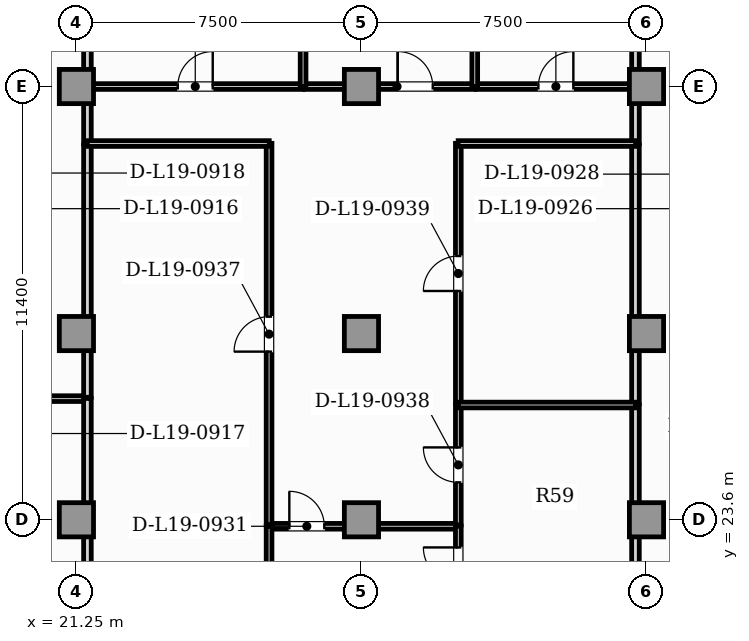
"""IFC4 building model, lengths in metres.
Left out: names, types, materials, properties, quantities, classifications, styles, units other than length and angle.
Written with IfcOpenShell. Run it as: python <this file> out.ifc"""

import sys

from ifc_helpers import new_model, si_unit, direction, frame, frame_2d, origin, origin_2d, place, context, subcontext, project, spatial, rectangle, extrude, element, fill, save


model = new_model("IFC4")
c1 = context("Model", 3, precision=1e-05, world=origin(), true_north=direction((0.0, 1.0)))
c2 = subcontext(c1, "Body", "Model", "MODEL_VIEW")
j1 = project(units=[si_unit("LENGTHUNIT", "METRE"), si_unit("PLANEANGLEUNIT", "RADIAN")], contexts=[c1])
p1 = place(None, origin())
s1 = spatial("IfcSite", under=j1, at=p1, CompositionType="ELEMENT")
p2 = place(p1, origin())
s2 = spatial("IfcBuilding", under=s1, at=p2, CompositionType="ELEMENT")
p3 = place(p2, frame((0.0, 0.0, 81.05)))
s3 = spatial("IfcBuildingStorey", under=s2, at=p3, CompositionType="ELEMENT", Elevation=81.05)
for number, where, z_axis, x_axis in (
    (1, (21.25, 23.6, 0.0), (0.0, 0.0, 1.0), (1.0, 0.0, 0.0)),
    (2, (28.75, 23.6, 0.0), (0.0, 0.0, 1.0), (1.0, 0.0, 0.0)),
    (3, (36.25, 23.6, 0.0), (0.0, 0.0, 1.0), (1.0, 0.0, 0.0)),
    (4, (21.25, 28.5, 0.0), (0.0, 0.0, 1.0), (1.0, 0.0, 0.0)),
    (5, (28.75, 28.5, 0.0), (0.0, 0.0, 1.0), (1.0, 0.0, 0.0)),
    (6, (36.25, 28.5, 0.0), (0.0, 0.0, 1.0), (1.0, 0.0, 0.0)),
    (7, (21.25, 35.0, 0.0), (0.0, 0.0, 1.0), (1.0, 0.0, 0.0)),
    (8, (28.75, 35.0, 0.0), (0.0, 0.0, 1.0), (1.0, 0.0, 0.0)),
    (9, (36.25, 35.0, 0.0), (0.0, 0.0, 1.0), (1.0, 0.0, 0.0)),
):
    element("IfcColumn", number, at=place(p3, frame(where, z_axis=z_axis, x_axis=x_axis)), inside=s3, PredefinedType="COLUMN", context=c2, shape_type="SweptSolid", body=[
        extrude(rectangle(XDim=0.9, YDim=0.9, at=origin_2d()), origin(), (0.0, 0.0, 1.0), 3.85),
    ])
p4 = place(p3, frame((18.818, 26.788, 0.0), z_axis=(0.0, 0.0, 1.0), x_axis=(1.0, 0.0, 0.0)))
e10 = element("IfcWall", 10, at=p4, inside=s3, PredefinedType="PARTITIONING", context=c2, shape_type="SweptSolid", body=[
    extrude(rectangle(XDim=2.727, YDim=0.15, at=frame_2d((1.364, 0.0))), origin(), (0.0, 0.0, 1.0), 3.6),
])
p5 = place(p3, frame((21.54, 17.769, 0.0), z_axis=(0.0, 0.0, 1.0), x_axis=(0.0, 1.0, 0.0)))
e11 = element("IfcWall", 11, at=p5, inside=s3, PredefinedType="PARTITIONING", context=c2, shape_type="SweptSolid", body=[
    extrude(rectangle(XDim=9.024, YDim=0.2, at=frame_2d((4.512, 0.0))), origin(), (0.0, 0.0, 1.0), 3.6),
])
p6 = place(p3, frame((21.54, 33.495, 0.0), z_axis=(0.0, 0.0, 1.0), x_axis=(0.0, 1.0, 0.0)))
e12 = element("IfcWall", 12, at=p6, inside=s3, PredefinedType="PARTITIONING", context=c2, shape_type="SweptSolid", body=[
    extrude(rectangle(XDim=1.51, YDim=0.2, at=frame_2d((0.755, 0.0))), origin(), (0.0, 0.0, 1.0), 3.6),
])
p7 = place(p3, frame((21.54, 26.823, 0.0), z_axis=(0.0, 0.0, 1.0), x_axis=(0.0, 1.0, 0.0)))
e13 = element("IfcWall", 13, at=p7, inside=s3, PredefinedType="PARTITIONING", context=c2, shape_type="SweptSolid", body=[
    extrude(rectangle(XDim=6.642, YDim=0.2, at=frame_2d((3.321, 0.0))), origin(), (0.0, 0.0, 1.0), 3.6),
])
p8 = place(p3, frame((21.54, 35.035, 0.0), z_axis=(0.0, 0.0, 1.0), x_axis=(0.0, 1.0, 0.0)))
e14 = element("IfcWall", 14, at=p8, inside=s3, PredefinedType="PARTITIONING", context=c2, shape_type="SweptSolid", body=[
    extrude(rectangle(XDim=3.55, YDim=0.2, at=frame_2d((1.775, 0.0))), origin(), (0.0, 0.0, 1.0), 3.6),
])
p9 = place(p3, frame((35.96, 33.495, 0.0), z_axis=(0.0, 0.0, 1.0), x_axis=(0.0, 1.0, 0.0)))
e15 = element("IfcWall", 15, at=p9, inside=s3, PredefinedType="PARTITIONING", context=c2, shape_type="SweptSolid", body=[
    extrude(rectangle(XDim=1.51, YDim=0.2, at=frame_2d((0.755, 0.0))), origin(), (0.0, 0.0, 1.0), 3.6),
])
p10 = place(p3, frame((35.96, 21.391, 0.0), z_axis=(0.0, 0.0, 1.0), x_axis=(0.0, 1.0, 0.0)))
e16 = element("IfcWall", 16, at=p10, inside=s3, PredefinedType="PARTITIONING", context=c2, shape_type="SweptSolid", body=[
    extrude(rectangle(XDim=5.234, YDim=0.2, at=frame_2d((2.617, 0.0))), origin(), (0.0, 0.0, 1.0), 3.6),
])
p11 = place(p3, frame((35.96, 26.655, 0.0), z_axis=(0.0, 0.0, 1.0), x_axis=(0.0, 1.0, 0.0)))
e17 = element("IfcWall", 17, at=p11, inside=s3, PredefinedType="PARTITIONING", context=c2, shape_type="SweptSolid", body=[
    extrude(rectangle(XDim=6.81, YDim=0.2, at=frame_2d((3.405, 0.0))), origin(), (0.0, 0.0, 1.0), 3.6),
])
p12 = place(p3, frame((35.96, 35.035, 0.0), z_axis=(0.0, 0.0, 1.0), x_axis=(0.0, 1.0, 0.0)))
e18 = element("IfcWall", 18, at=p12, inside=s3, PredefinedType="PARTITIONING", context=c2, shape_type="SweptSolid", body=[
    extrude(rectangle(XDim=3.55, YDim=0.2, at=frame_2d((1.775, 0.0))), origin(), (0.0, 0.0, 1.0), 3.6),
])
p13 = place(p3, frame((26.314, 23.429, 0.0), z_axis=(0.0, 0.0, 1.0), x_axis=(1.0, 0.0, 0.0)))
e19 = element("IfcWall", 19, at=p13, inside=s3, PredefinedType="PARTITIONING", context=c2, shape_type="SweptSolid", body=[
    extrude(rectangle(XDim=4.99, YDim=0.15, at=frame_2d((2.495, 0.0))), origin(), (0.0, 0.0, 1.0), 2.964),
])
p14 = place(p13, frame((0.538, 0.0, 0.0)))
e20 = element("IfcOpeningElement", 20, at=p14, cuts=e19, PredefinedType="OPENING", context=c2, shape_type="SweptSolid", body=[
    extrude(rectangle(XDim=0.92, YDim=2.1, at=frame_2d((0.46, 1.05))), frame((0.0, 0.085, 0.0), z_axis=(0.0, -1.0, 0.0), x_axis=(1.0, 0.0, 0.0)), (0.0, 0.0, 1.0), 0.17),
])
p15 = place(p3, frame((26.319, 15.635, 0.0), z_axis=(0.0, 0.0, 1.0), x_axis=(0.0, 1.0, 0.0)))
e21 = element("IfcWall", 21, at=p15, inside=s3, PredefinedType="PARTITIONING", context=c2, shape_type="SweptSolid", body=[
    extrude(rectangle(XDim=7.799, YDim=0.15, at=frame_2d((3.9, 0.0))), origin(), (0.0, 0.0, 1.0), 3.6),
])
p16 = place(p15, frame((3.44, 0.0, 0.0)))
e22 = element("IfcOpeningElement", 22, at=p16, cuts=e21, PredefinedType="OPENING", context=c2, shape_type="SweptSolid", body=[
    extrude(rectangle(XDim=0.92, YDim=2.1, at=frame_2d((0.46, 1.05))), frame((0.0, 0.085, 0.0), z_axis=(0.0, -1.0, 0.0), x_axis=(1.0, 0.0, 0.0)), (0.0, 0.0, 1.0), 0.17),
])
p17 = place(p3, frame((31.299, 21.391, 0.0), z_axis=(0.0, 0.0, 1.0), x_axis=(0.0, 1.0, 0.0)))
e23 = element("IfcWall", 23, at=p17, inside=s3, PredefinedType="PARTITIONING", context=c2, shape_type="SweptSolid", body=[
    extrude(rectangle(XDim=2.043, YDim=0.15, at=frame_2d((1.021, 0.0))), origin(), (0.0, 0.0, 1.0), 3.6),
])
p18 = place(p17, frame((0.562, 0.0, 0.0)))
e24 = element("IfcOpeningElement", 24, at=p18, cuts=e23, PredefinedType="OPENING", context=c2, shape_type="SweptSolid", body=[
    extrude(rectangle(XDim=0.92, YDim=2.1, at=frame_2d((0.46, 1.05))), frame((0.0, 0.085, 0.0), z_axis=(0.0, -1.0, 0.0), x_axis=(1.0, 0.0, 0.0)), (0.0, 0.0, 1.0), 0.17),
])
p19 = place(p3, frame((26.319, 23.464, 0.0), z_axis=(0.0, 0.0, 1.0), x_axis=(0.0, 1.0, 0.0)))
e25 = element("IfcWall", 25, at=p19, inside=s3, PredefinedType="PARTITIONING", context=c2, shape_type="SweptSolid", body=[
    extrude(rectangle(XDim=10.041, YDim=0.15, at=frame_2d((5.02, 0.0))), origin(), (0.0, 0.0, 1.0), 3.6),
])
p20 = place(p19, frame((4.56, 0.0, 0.0)))
e26 = element("IfcOpeningElement", 26, at=p20, cuts=e25, PredefinedType="OPENING", context=c2, shape_type="SweptSolid", body=[
    extrude(rectangle(XDim=0.92, YDim=2.1, at=frame_2d((0.46, 1.05))), frame((0.0, 0.085, 0.0), z_axis=(0.0, -1.0, 0.0), x_axis=(1.0, 0.0, 0.0)), (0.0, 0.0, 1.0), 0.17),
])
p21 = place(p3, frame((21.535, 33.5, 0.0), z_axis=(0.0, 0.0, 1.0), x_axis=(1.0, 0.0, 0.0)))
e27 = element("IfcWall", 27, at=p21, inside=s3, PredefinedType="PARTITIONING", context=c2, shape_type="SweptSolid", body=[
    extrude(rectangle(XDim=4.789, YDim=0.15, at=frame_2d((2.395, 0.0))), origin(), (0.0, 0.0, 1.0), 3.6),
])
p22 = place(p3, frame((31.299, 23.464, 0.0), z_axis=(0.0, 0.0, 1.0), x_axis=(0.0, 1.0, 0.0)))
e28 = element("IfcWall", 28, at=p22, inside=s3, PredefinedType="PARTITIONING", context=c2, shape_type="SweptSolid", body=[
    extrude(rectangle(XDim=3.161, YDim=0.15, at=frame_2d((1.58, 0.0))), origin(), (0.0, 0.0, 1.0), 3.6),
])
p23 = place(p22, frame((1.12, 0.0, 0.0)))
e29 = element("IfcOpeningElement", 29, at=p23, cuts=e28, PredefinedType="OPENING", context=c2, shape_type="SweptSolid", body=[
    extrude(rectangle(XDim=0.92, YDim=2.1, at=frame_2d((0.46, 1.05))), frame((0.0, 0.085, 0.0), z_axis=(0.0, -1.0, 0.0), x_axis=(1.0, 0.0, 0.0)), (0.0, 0.0, 1.0), 0.17),
])
p24 = place(p3, frame((31.299, 26.655, 0.0), z_axis=(0.0, 0.0, 1.0), x_axis=(0.0, 1.0, 0.0)))
e30 = element("IfcWall", 30, at=p24, inside=s3, PredefinedType="PARTITIONING", context=c2, shape_type="SweptSolid", body=[
    extrude(rectangle(XDim=6.85, YDim=0.15, at=frame_2d((3.425, 0.0))), origin(), (0.0, 0.0, 1.0), 3.6),
])
p25 = place(p24, frame((2.965, 0.0, 0.0)))
e31 = element("IfcOpeningElement", 31, at=p25, cuts=e30, PredefinedType="OPENING", context=c2, shape_type="SweptSolid", body=[
    extrude(rectangle(XDim=0.92, YDim=2.1, at=frame_2d((0.46, 1.05))), frame((0.0, 0.085, 0.0), z_axis=(0.0, -1.0, 0.0), x_axis=(1.0, 0.0, 0.0)), (0.0, 0.0, 1.0), 0.17),
])
p26 = place(p3, frame((31.294, 33.5, 0.0), z_axis=(0.0, 0.0, 1.0), x_axis=(1.0, 0.0, 0.0)))
e32 = element("IfcWall", 32, at=p26, inside=s3, PredefinedType="PARTITIONING", context=c2, shape_type="SweptSolid", body=[
    extrude(rectangle(XDim=4.671, YDim=0.15, at=frame_2d((2.335, 0.0))), origin(), (0.0, 0.0, 1.0), 3.6),
])
p27 = place(p3, frame((21.535, 35.0, 0.0), z_axis=(0.0, 0.0, 1.0), x_axis=(1.0, 0.0, 0.0)))
e33 = element("IfcWall", 33, at=p27, inside=s3, PredefinedType="PARTITIONING", context=c2, shape_type="SweptSolid", body=[
    extrude(rectangle(XDim=5.684, YDim=0.15, at=frame_2d((2.842, 0.0))), origin(), (0.0, 0.0, 1.0), 2.964),
])
p28 = place(p27, frame((2.382, 0.0, 0.0)))
e34 = element("IfcOpeningElement", 34, at=p28, cuts=e33, PredefinedType="OPENING", context=c2, shape_type="SweptSolid", body=[
    extrude(rectangle(XDim=0.92, YDim=2.1, at=frame_2d((0.46, 1.05))), frame((0.0, 0.085, 0.0), z_axis=(0.0, -1.0, 0.0), x_axis=(1.0, 0.0, 0.0)), (0.0, 0.0, 1.0), 0.17),
])
p29 = place(p3, frame((27.249, 35.0, 0.0), z_axis=(0.0, 0.0, 1.0), x_axis=(1.0, 0.0, 0.0)))
e35 = element("IfcWall", 35, at=p29, inside=s3, PredefinedType="PARTITIONING", context=c2, shape_type="SweptSolid", body=[
    extrude(rectangle(XDim=4.488, YDim=0.15, at=frame_2d((2.244, 0.0))), origin(), (0.0, 0.0, 1.0), 2.964),
])
p30 = place(p29, frame((2.457, 0.0, 0.0)))
e36 = element("IfcOpeningElement", 36, at=p30, cuts=e35, PredefinedType="OPENING", context=c2, shape_type="SweptSolid", body=[
    extrude(rectangle(XDim=0.92, YDim=2.1, at=frame_2d((0.46, 1.05))), frame((0.0, 0.085, 0.0), z_axis=(0.0, -1.0, 0.0), x_axis=(1.0, 0.0, 0.0)), (0.0, 0.0, 1.0), 0.17),
])
p31 = place(p3, frame((31.767, 35.0, 0.0), z_axis=(0.0, 0.0, 1.0), x_axis=(1.0, 0.0, 0.0)))
e37 = element("IfcWall", 37, at=p31, inside=s3, PredefinedType="PARTITIONING", context=c2, shape_type="SweptSolid", body=[
    extrude(rectangle(XDim=4.198, YDim=0.15, at=frame_2d((2.099, 0.0))), origin(), (0.0, 0.0, 1.0), 2.964),
])
p32 = place(p31, frame((1.639, 0.0, 0.0)))
e38 = element("IfcOpeningElement", 38, at=p32, cuts=e37, PredefinedType="OPENING", context=c2, shape_type="SweptSolid", body=[
    extrude(rectangle(XDim=0.92, YDim=2.1, at=frame_2d((0.46, 1.05))), frame((0.0, 0.085, 0.0), z_axis=(0.0, -1.0, 0.0), x_axis=(1.0, 0.0, 0.0)), (0.0, 0.0, 1.0), 0.17),
])
p33 = place(p3, frame((31.294, 26.62, 0.0), z_axis=(0.0, 0.0, 1.0), x_axis=(1.0, 0.0, 0.0)))
e39 = element("IfcWall", 39, at=p33, inside=s3, PredefinedType="PARTITIONING", context=c2, shape_type="SweptSolid", body=[
    extrude(rectangle(XDim=4.671, YDim=0.15, at=frame_2d((2.335, 0.0))), origin(), (0.0, 0.0, 1.0), 3.6),
])
p34 = place(p3, frame((27.214, 34.995, 0.0), z_axis=(0.0, 0.0, 1.0), x_axis=(0.0, 1.0, 0.0)))
e40 = element("IfcWall", 40, at=p34, inside=s3, PredefinedType="PARTITIONING", context=c2, shape_type="SweptSolid", body=[
    extrude(rectangle(XDim=5.012, YDim=0.15, at=frame_2d((2.506, 0.0))), origin(), (0.0, 0.0, 1.0), 3.6),
])
p35 = place(p3, frame((31.732, 34.995, 0.0), z_axis=(0.0, 0.0, 1.0), x_axis=(0.0, 1.0, 0.0)))
e41 = element("IfcWall", 41, at=p35, inside=s3, PredefinedType="PARTITIONING", context=c2, shape_type="SweptSolid", body=[
    extrude(rectangle(XDim=5.006, YDim=0.15, at=frame_2d((2.503, 0.0))), origin(), (0.0, 0.0, 1.0), 3.6),
])
p36 = place(p14, origin())
e42 = element("IfcDoor", 42, at=p36, inside=s3, OperationType="SINGLE_SWING_LEFT", PredefinedType="DOOR", context=c2, shape_type="SweptSolid", body=[
    extrude(rectangle(XDim=0.92, YDim=2.1, at=frame_2d((0.46, 1.05))), frame((0.0, 0.025, 0.0), z_axis=(0.0, -1.0, 0.0), x_axis=(1.0, 0.0, 0.0)), (0.0, 0.0, 1.0), 0.05),
])
fill(e20, e42)
p37 = place(p18, origin())
e43 = element("IfcDoor", 43, at=p37, inside=s3, OperationType="SINGLE_SWING_RIGHT", PredefinedType="DOOR", context=c2, shape_type="SweptSolid", body=[
    extrude(rectangle(XDim=0.92, YDim=2.1, at=frame_2d((0.46, 1.05))), frame((0.0, 0.025, 0.0), z_axis=(0.0, -1.0, 0.0), x_axis=(1.0, 0.0, 0.0)), (0.0, 0.0, 1.0), 0.05),
])
fill(e24, e43)
p38 = place(p20, origin())
e44 = element("IfcDoor", 44, at=p38, inside=s3, OperationType="SINGLE_SWING_LEFT", PredefinedType="DOOR", context=c2, shape_type="SweptSolid", body=[
    extrude(rectangle(XDim=0.92, YDim=2.1, at=frame_2d((0.46, 1.05))), frame((0.0, 0.025, 0.0), z_axis=(0.0, -1.0, 0.0), x_axis=(1.0, 0.0, 0.0)), (0.0, 0.0, 1.0), 0.05),
])
fill(e26, e44)
p39 = place(p23, origin())
e45 = element("IfcDoor", 45, at=p39, inside=s3, OperationType="SINGLE_SWING_RIGHT", PredefinedType="DOOR", context=c2, shape_type="SweptSolid", body=[
    extrude(rectangle(XDim=0.92, YDim=2.1, at=frame_2d((0.46, 1.05))), frame((0.0, 0.025, 0.0), z_axis=(0.0, -1.0, 0.0), x_axis=(1.0, 0.0, 0.0)), (0.0, 0.0, 1.0), 0.05),
])
fill(e29, e45)
p40 = place(p25, origin())
e46 = element("IfcDoor", 46, at=p40, inside=s3, OperationType="SINGLE_SWING_LEFT", PredefinedType="DOOR", context=c2, shape_type="SweptSolid", body=[
    extrude(rectangle(XDim=0.92, YDim=2.1, at=frame_2d((0.46, 1.05))), frame((0.0, 0.025, 0.0), z_axis=(0.0, -1.0, 0.0), x_axis=(1.0, 0.0, 0.0)), (0.0, 0.0, 1.0), 0.05),
])
fill(e31, e46)
p41 = place(p28, origin())
e47 = element("IfcDoor", 47, at=p41, inside=s3, OperationType="SINGLE_SWING_RIGHT", PredefinedType="DOOR", context=c2, shape_type="SweptSolid", body=[
    extrude(rectangle(XDim=0.92, YDim=2.1, at=frame_2d((0.46, 1.05))), frame((0.0, 0.025, 0.0), z_axis=(0.0, -1.0, 0.0), x_axis=(1.0, 0.0, 0.0)), (0.0, 0.0, 1.0), 0.05),
])
fill(e34, e47)
p42 = place(p30, origin())
e48 = element("IfcDoor", 48, at=p42, inside=s3, OperationType="SINGLE_SWING_LEFT", PredefinedType="DOOR", context=c2, shape_type="SweptSolid", body=[
    extrude(rectangle(XDim=0.92, YDim=2.1, at=frame_2d((0.46, 1.05))), frame((0.0, 0.025, 0.0), z_axis=(0.0, -1.0, 0.0), x_axis=(1.0, 0.0, 0.0)), (0.0, 0.0, 1.0), 0.05),
])
fill(e36, e48)
p43 = place(p32, origin())
e49 = element("IfcDoor", 49, at=p43, inside=s3, OperationType="SINGLE_SWING_RIGHT", PredefinedType="DOOR", context=c2, shape_type="SweptSolid", body=[
    extrude(rectangle(XDim=0.92, YDim=2.1, at=frame_2d((0.46, 1.05))), frame((0.0, 0.025, 0.0), z_axis=(0.0, -1.0, 0.0), x_axis=(1.0, 0.0, 0.0)), (0.0, 0.0, 1.0), 0.05),
])
fill(e38, e49)
save(model, sys.argv[1])
